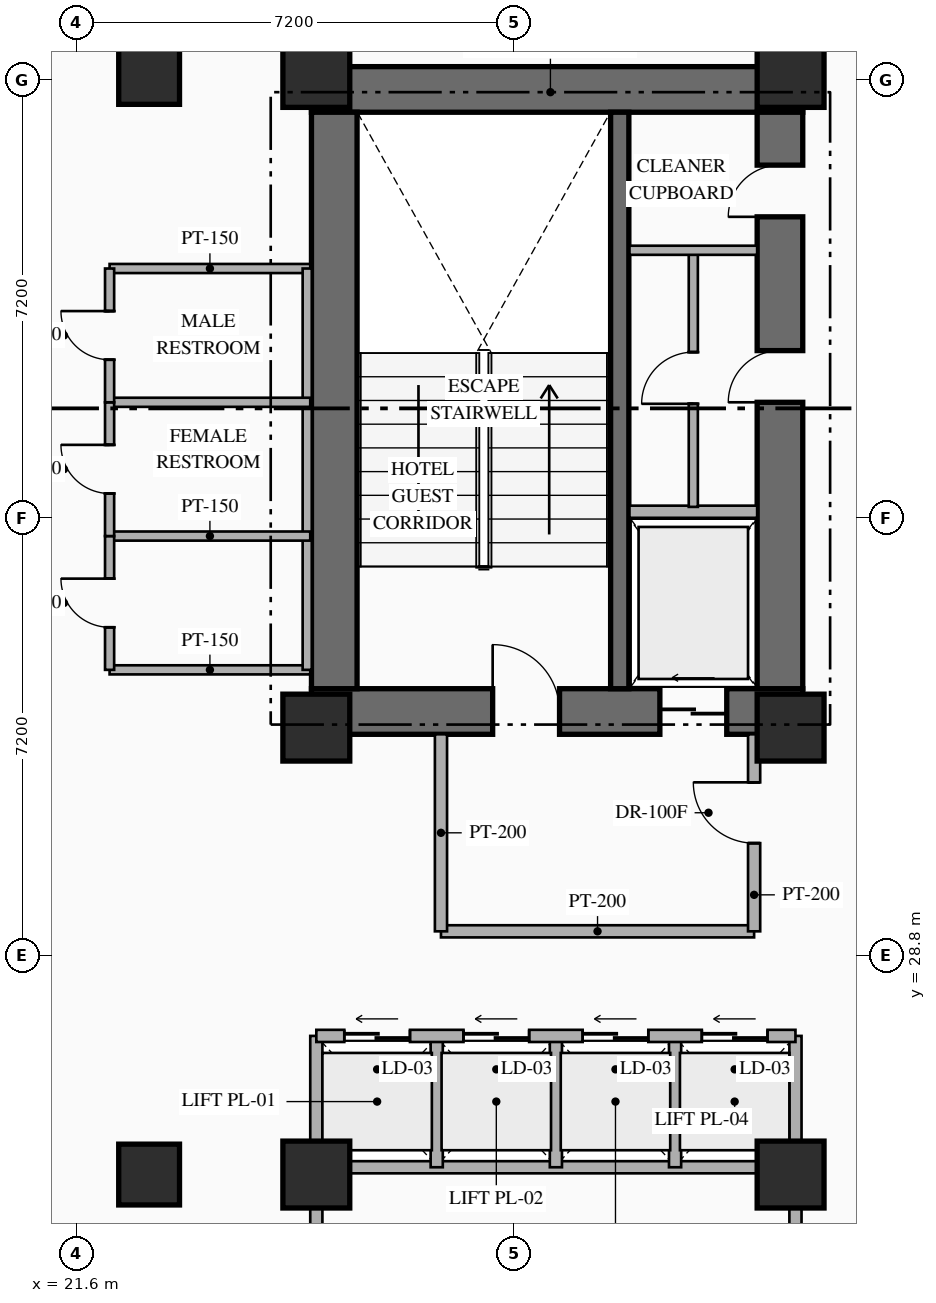
"""IFC4 building model, lengths in metres.
Left out: names, types, materials, properties, quantities, classifications, styles, units other than length and angle.
Written with IfcOpenShell. Run it as: python <this file> out.ifc"""

import sys

from ifc_helpers import new_model, si_unit, direction, frame, frame_2d, origin, origin_2d, place, context, subcontext, project, spatial, rectangle, hollow_rectangle, extrude, element, fill, save


model = new_model("IFC4")
c1 = context("Model", 3, precision=1e-05, world=origin(), true_north=direction((0.0, 1.0)))
c2 = subcontext(c1, "Body", "Model", "MODEL_VIEW")
j1 = project(units=[si_unit("LENGTHUNIT", "METRE"), si_unit("PLANEANGLEUNIT", "RADIAN")], contexts=[c1])
p1 = place(None, origin())
s1 = spatial("IfcSite", under=j1, at=p1, CompositionType="ELEMENT")
p2 = place(p1, origin())
s2 = spatial("IfcBuilding", under=s1, at=p2, CompositionType="ELEMENT")
p3 = place(p2, frame((0.0, 0.0, 63.4)))
s3 = spatial("IfcBuildingStorey", under=s2, at=p3, CompositionType="ELEMENT", Elevation=63.4)
p4 = place(p3, frame((25.47, 32.815, 0.0), z_axis=(0.0, 0.0, 1.0), x_axis=(1.0, 0.0, 0.0)))
e1 = element("IfcWall", 1, at=p4, inside=s3, PredefinedType="SHEAR", context=c2, shape_type="SweptSolid", body=[
    extrude(rectangle(XDim=8.08, YDim=0.75, at=frame_2d((4.04, 0.0))), origin(), (0.0, 0.0, 1.0), 3.35),
])
p5 = place(p4, frame((2.98, 0.0, 0.0)))
e2 = element("IfcOpeningElement", 2, at=p5, cuts=e1, PredefinedType="OPENING", context=c2, shape_type="SweptSolid", body=[
    extrude(rectangle(XDim=1.1, YDim=2.2, at=frame_2d((0.55, 1.1))), frame((0.0, 0.385, 0.0), z_axis=(0.0, -1.0, 0.0), x_axis=(1.0, 0.0, 0.0)), (0.0, 0.0, 1.0), 0.77),
])
p6 = place(p4, frame((5.73, 0.0, 0.0)))
e3 = element("IfcOpeningElement", 3, at=p6, cuts=e1, PredefinedType="OPENING", context=c2, shape_type="SweptSolid", body=[
    extrude(rectangle(XDim=1.1, YDim=2.15, at=frame_2d((0.55, 1.075))), frame((0.0, 0.385, 0.0), z_axis=(0.0, -1.0, 0.0), x_axis=(1.0, 0.0, 0.0)), (0.0, 0.0, 1.0), 0.77),
])
p7 = place(p3, frame((25.47, 43.045, 0.0), z_axis=(0.0, 0.0, 1.0), x_axis=(1.0, 0.0, 0.0)))
e4 = element("IfcWall", 4, at=p7, inside=s3, PredefinedType="SHEAR", context=c2, shape_type="SweptSolid", body=[
    extrude(rectangle(XDim=8.08, YDim=0.75, at=frame_2d((4.04, 0.0))), origin(), (0.0, 0.0, 1.0), 3.35),
])
p8 = place(p3, frame((25.845, 33.19, 0.0), z_axis=(0.0, 0.0, 1.0), x_axis=(0.0, 1.0, 0.0)))
e5 = element("IfcWall", 5, at=p8, inside=s3, PredefinedType="SHEAR", context=c2, shape_type="SweptSolid", body=[
    extrude(rectangle(XDim=9.48, YDim=0.75, at=frame_2d((4.74, 0.0))), origin(), (0.0, 0.0, 1.0), 3.35),
])
p9 = place(p3, frame((33.175, 33.19, 0.0), z_axis=(0.0, 0.0, 1.0), x_axis=(0.0, 1.0, 0.0)))
e6 = element("IfcWall", 6, at=p9, inside=s3, PredefinedType="SHEAR", context=c2, shape_type="SweptSolid", body=[
    extrude(rectangle(XDim=9.48, YDim=0.75, at=frame_2d((4.74, 0.0))), origin(), (0.0, 0.0, 1.0), 3.35),
])
p10 = place(p9, frame((4.71, 0.0, 0.0)))
e7 = element("IfcOpeningElement", 7, at=p10, cuts=e6, PredefinedType="OPENING", context=c2, shape_type="SweptSolid", body=[
    extrude(rectangle(XDim=0.85, YDim=2.08, at=frame_2d((0.425, 1.04))), frame((0.0, 0.385, 0.0), z_axis=(0.0, -1.0, 0.0), x_axis=(1.0, 0.0, 0.0)), (0.0, 0.0, 1.0), 0.77),
])
p11 = place(p9, frame((7.76, 0.0, 0.0)))
e8 = element("IfcOpeningElement", 8, at=p11, cuts=e6, PredefinedType="OPENING", context=c2, shape_type="SweptSolid", body=[
    extrude(rectangle(XDim=0.85, YDim=2.08, at=frame_2d((0.425, 1.04))), frame((0.0, 0.385, 0.0), z_axis=(0.0, -1.0, 0.0), x_axis=(1.0, 0.0, 0.0)), (0.0, 0.0, 1.0), 0.77),
])
p12 = place(p3, frame((30.54, 33.19, 0.0), z_axis=(0.0, 0.0, 1.0), x_axis=(0.0, 1.0, 0.0)))
e9 = element("IfcWall", 9, at=p12, inside=s3, PredefinedType="SHEAR", context=c2, shape_type="SweptSolid", body=[
    extrude(rectangle(XDim=9.48, YDim=0.3, at=frame_2d((4.74, 0.0))), origin(), (0.0, 0.0, 1.0), 3.35),
])
for number, where, z_axis, x_axis in (
    (10, (25.55, 32.55, 0.0), (0.0, 0.0, 1.0), (1.0, 0.0, 0.0)),
    (11, (33.35, 32.55, 0.0), (0.0, 0.0, 1.0), (1.0, 0.0, 0.0)),
    (12, (25.55, 43.3, 0.0), (0.0, 0.0, 1.0), (1.0, 0.0, 0.0)),
    (13, (33.35, 43.3, 0.0), (0.0, 0.0, 1.0), (1.0, 0.0, 0.0)),
):
    element("IfcColumn", number, at=place(p3, frame(where, z_axis=z_axis, x_axis=x_axis)), inside=s3, PredefinedType="COLUMN", context=c2, shape_type="SweptSolid", body=[
        extrude(rectangle(XDim=1.1, YDim=1.1, at=origin_2d()), origin(), (0.0, 0.0, 1.0), 3.35),
    ])
for number, where, z_axis, x_axis in (
    (14, (25.55, 25.2, 0.0), (0.0, 0.0, 1.0), (1.0, 0.0, 0.0)),
    (15, (33.35, 25.2, 0.0), (0.0, 0.0, 1.0), (1.0, 0.0, 0.0)),
):
    element("IfcColumn", number, at=place(p3, frame(where, z_axis=z_axis, x_axis=x_axis)), inside=s3, PredefinedType="COLUMN", context=c2, shape_type="SweptSolid", body=[
        extrude(hollow_rectangle(XDim=1.1, YDim=1.1, WallThickness=0.04, at=origin_2d()), origin(), (0.0, 0.0, 1.0), 3.35),
    ])
for number, where, z_axis, x_axis in (
    (16, (22.8, 25.2, 0.0), (0.0, 0.0, 1.0), (1.0, 0.0, 0.0)),
    (17, (22.8, 43.3, 0.0), (0.0, 0.0, 1.0), (1.0, 0.0, 0.0)),
):
    element("IfcColumn", number, at=place(p3, frame(where, z_axis=z_axis, x_axis=x_axis)), inside=s3, PredefinedType="COLUMN", context=c2, shape_type="SweptSolid", body=[
        extrude(hollow_rectangle(XDim=1.0, YDim=1.0, WallThickness=0.038, at=origin_2d()), origin(), (0.0, 0.0, 1.0), 3.35),
    ])
p13 = place(p3, frame((30.7, 36.1, 0.0), z_axis=(0.0, 0.0, 1.0), x_axis=(1.0, 0.0, 0.0)))
e18 = element("IfcWall", 18, at=p13, inside=s3, PredefinedType="STANDARD", context=c2, shape_type="SweptSolid", body=[
    extrude(rectangle(XDim=2.1, YDim=0.2, at=frame_2d((1.05, 0.0))), origin(), (0.0, 0.0, 1.0), 3.13),
])
p14 = place(p3, frame((31.75, 36.18, 0.0), z_axis=(0.0, 0.0, 1.0), x_axis=(0.0, 1.0, 0.0)))
e19 = element("IfcWall", 19, at=p14, inside=s3, PredefinedType="PARTITIONING", context=c2, shape_type="SweptSolid", body=[
    extrude(rectangle(XDim=4.24, YDim=0.15, at=frame_2d((2.12, 0.0))), origin(), (0.0, 0.0, 1.0), 3.13),
])
p15 = place(p14, frame((1.695, 0.0, 0.0)))
e20 = element("IfcOpeningElement", 20, at=p15, cuts=e19, PredefinedType="OPENING", context=c2, shape_type="SweptSolid", body=[
    extrude(rectangle(XDim=0.85, YDim=2.08, at=frame_2d((0.425, 1.04))), frame((0.0, 0.085, 0.0), z_axis=(0.0, -1.0, 0.0), x_axis=(1.0, 0.0, 0.0)), (0.0, 0.0, 1.0), 0.17),
])
p16 = place(p3, frame((30.7, 40.4, 0.0), z_axis=(0.0, 0.0, 1.0), x_axis=(1.0, 0.0, 0.0)))
e21 = element("IfcWall", 21, at=p16, inside=s3, PredefinedType="PARTITIONING", context=c2, shape_type="SweptSolid", body=[
    extrude(rectangle(XDim=2.1, YDim=0.15, at=frame_2d((1.05, 0.0))), origin(), (0.0, 0.0, 1.0), 3.13),
])
p17 = place(p3, frame((27.6, 29.2, 0.0), z_axis=(0.0, 0.0, 1.0), x_axis=(1.0, 0.0, 0.0)))
e22 = element("IfcWall", 22, at=p17, inside=s3, PredefinedType="STANDARD", context=c2, shape_type="SweptSolid", body=[
    extrude(rectangle(XDim=5.15, YDim=0.2, at=frame_2d((2.575, 0.0))), origin(), (0.0, 0.0, 1.0), 3.13),
])
p18 = place(p3, frame((27.6, 29.2, 0.0), z_axis=(0.0, 0.0, 1.0), x_axis=(0.0, 1.0, 0.0)))
e23 = element("IfcWall", 23, at=p18, inside=s3, PredefinedType="STANDARD", context=c2, shape_type="SweptSolid", body=[
    extrude(rectangle(XDim=3.24, YDim=0.2, at=frame_2d((1.62, 0.0))), origin(), (0.0, 0.0, 1.0), 3.13),
])
p19 = place(p3, frame((32.75, 29.2, 0.0), z_axis=(0.0, 0.0, 1.0), x_axis=(0.0, 1.0, 0.0)))
e24 = element("IfcWall", 24, at=p19, inside=s3, PredefinedType="STANDARD", context=c2, shape_type="SweptSolid", body=[
    extrude(rectangle(XDim=3.24, YDim=0.2, at=frame_2d((1.62, 0.0))), origin(), (0.0, 0.0, 1.0), 3.13),
])
p20 = place(p19, frame((1.45, 0.0, 0.0)))
e25 = element("IfcOpeningElement", 25, at=p20, cuts=e24, PredefinedType="OPENING", context=c2, shape_type="SweptSolid", body=[
    extrude(rectangle(XDim=1.0, YDim=2.2, at=frame_2d((0.5, 1.1))), frame((0.0, 0.11, 0.0), z_axis=(0.0, -1.0, 0.0), x_axis=(1.0, 0.0, 0.0)), (0.0, 0.0, 1.0), 0.22),
])
for number, where, z_axis, x_axis in (
    (26, (25.55, 23.4, 0.0), (0.0, 0.0, 1.0), (0.0, 1.0, 0.0)),
    (27, (33.43, 23.4, 0.0), (0.0, 0.0, 1.0), (0.0, 1.0, 0.0)),
):
    element("IfcWall", number, at=place(p3, frame(where, z_axis=z_axis, x_axis=x_axis)), inside=s3, PredefinedType="STANDARD", context=c2, shape_type="SweptSolid", body=[
        extrude(rectangle(XDim=4.08, YDim=0.2, at=frame_2d((2.04, 0.0))), origin(), (0.0, 0.0, 1.0), 2.425),
    ])
p21 = place(p3, frame((25.55, 25.32, 0.0), z_axis=(0.0, 0.0, 1.0), x_axis=(1.0, 0.0, 0.0)))
e28 = element("IfcWall", 28, at=p21, inside=s3, PredefinedType="STANDARD", context=c2, shape_type="SweptSolid", body=[
    extrude(rectangle(XDim=7.88, YDim=0.2, at=frame_2d((3.94, 0.0))), origin(), (0.0, 0.0, 1.0), 2.525),
])
for number, where, z_axis, x_axis in (
    (29, (27.53, 25.32, 0.0), (0.0, 0.0, 1.0), (0.0, 1.0, 0.0)),
    (30, (29.49, 25.32, 0.0), (0.0, 0.0, 1.0), (0.0, 1.0, 0.0)),
    (31, (31.45, 25.32, 0.0), (0.0, 0.0, 1.0), (0.0, 1.0, 0.0)),
):
    element("IfcWall", number, at=place(p3, frame(where, z_axis=z_axis, x_axis=x_axis)), inside=s3, PredefinedType="STANDARD", context=c2, shape_type="SweptSolid", body=[
        extrude(rectangle(XDim=2.16, YDim=0.2, at=frame_2d((1.08, 0.0))), origin(), (0.0, 0.0, 1.0), 3.13),
    ])
p22 = place(p3, frame((25.55, 27.48, 0.0), z_axis=(0.0, 0.0, 1.0), x_axis=(1.0, 0.0, 0.0)))
e32 = element("IfcWall", 32, at=p22, inside=s3, PredefinedType="STANDARD", context=c2, shape_type="SweptSolid", body=[
    extrude(rectangle(XDim=7.88, YDim=0.2, at=frame_2d((3.94, 0.0))), origin(), (0.0, 0.0, 1.0), 3.13),
])
p23 = place(p22, frame((0.46, 0.0, 0.0)))
e33 = element("IfcOpeningElement", 33, at=p23, cuts=e32, PredefinedType="OPENING", context=c2, shape_type="SweptSolid", body=[
    extrude(rectangle(XDim=1.08, YDim=2.15, at=frame_2d((0.54, 1.075))), frame((0.0, 0.11, 0.0), z_axis=(0.0, -1.0, 0.0), x_axis=(1.0, 0.0, 0.0)), (0.0, 0.0, 1.0), 0.22),
])
p24 = place(p22, frame((2.42, 0.0, 0.0)))
e34 = element("IfcOpeningElement", 34, at=p24, cuts=e32, PredefinedType="OPENING", context=c2, shape_type="SweptSolid", body=[
    extrude(rectangle(XDim=1.08, YDim=2.15, at=frame_2d((0.54, 1.075))), frame((0.0, 0.11, 0.0), z_axis=(0.0, -1.0, 0.0), x_axis=(1.0, 0.0, 0.0)), (0.0, 0.0, 1.0), 0.22),
])
p25 = place(p22, frame((4.38, 0.0, 0.0)))
e35 = element("IfcOpeningElement", 35, at=p25, cuts=e32, PredefinedType="OPENING", context=c2, shape_type="SweptSolid", body=[
    extrude(rectangle(XDim=1.08, YDim=2.15, at=frame_2d((0.54, 1.075))), frame((0.0, 0.11, 0.0), z_axis=(0.0, -1.0, 0.0), x_axis=(1.0, 0.0, 0.0)), (0.0, 0.0, 1.0), 0.22),
])
p26 = place(p22, frame((6.34, 0.0, 0.0)))
e36 = element("IfcOpeningElement", 36, at=p26, cuts=e32, PredefinedType="OPENING", context=c2, shape_type="SweptSolid", body=[
    extrude(rectangle(XDim=1.08, YDim=2.15, at=frame_2d((0.54, 1.075))), frame((0.0, 0.11, 0.0), z_axis=(0.0, -1.0, 0.0), x_axis=(1.0, 0.0, 0.0)), (0.0, 0.0, 1.0), 0.22),
])
for number, where, z_axis, x_axis in (
    (37, (22.15, 33.5, 0.0), (0.0, 0.0, 1.0), (1.0, 0.0, 0.0)),
    (38, (22.15, 40.1, 0.0), (0.0, 0.0, 1.0), (1.0, 0.0, 0.0)),
):
    element("IfcWall", number, at=place(p3, frame(where, z_axis=z_axis, x_axis=x_axis)), inside=s3, PredefinedType="PARTITIONING", context=c2, shape_type="SweptSolid", body=[
        extrude(rectangle(XDim=3.3, YDim=0.15, at=frame_2d((1.65, 0.0))), origin(), (0.0, 0.0, 1.0), 3.13),
    ])
p27 = place(p3, frame((25.4, 33.5, 0.0), z_axis=(0.0, 0.0, 1.0), x_axis=(0.0, 1.0, 0.0)))
e39 = element("IfcWall", 39, at=p27, inside=s3, PredefinedType="PARTITIONING", context=c2, shape_type="SweptSolid", body=[
    extrude(rectangle(XDim=6.6, YDim=0.15, at=frame_2d((3.3, 0.0))), origin(), (0.0, 0.0, 1.0), 3.13),
])
for number, where, z_axis, x_axis in (
    (40, (22.15, 35.7, 0.0), (0.0, 0.0, 1.0), (1.0, 0.0, 0.0)),
    (41, (22.15, 37.9, 0.0), (0.0, 0.0, 1.0), (1.0, 0.0, 0.0)),
):
    element("IfcWall", number, at=place(p3, frame(where, z_axis=z_axis, x_axis=x_axis)), inside=s3, PredefinedType="PARTITIONING", context=c2, shape_type="SweptSolid", body=[
        extrude(rectangle(XDim=3.3, YDim=0.15, at=frame_2d((1.65, 0.0))), origin(), (0.0, 0.0, 1.0), 3.13),
    ])
p28 = place(p3, frame((22.15, 33.5, 0.0), z_axis=(0.0, 0.0, 1.0), x_axis=(0.0, 1.0, 0.0)))
e42 = element("IfcWall", 42, at=p28, inside=s3, PredefinedType="PARTITIONING", context=c2, shape_type="SweptSolid", body=[
    extrude(rectangle(XDim=2.2, YDim=0.15, at=frame_2d((1.1, 0.0))), origin(), (0.0, 0.0, 1.0), 3.13),
])
p29 = place(p28, frame((0.7, 0.0, 0.0)))
e43 = element("IfcOpeningElement", 43, at=p29, cuts=e42, PredefinedType="OPENING", context=c2, shape_type="SweptSolid", body=[
    extrude(rectangle(XDim=0.8, YDim=2.06, at=frame_2d((0.4, 1.03))), frame((0.0, 0.085, 0.0), z_axis=(0.0, -1.0, 0.0), x_axis=(1.0, 0.0, 0.0)), (0.0, 0.0, 1.0), 0.17),
])
p30 = place(p3, frame((22.15, 35.7, 0.0), z_axis=(0.0, 0.0, 1.0), x_axis=(0.0, 1.0, 0.0)))
e44 = element("IfcWall", 44, at=p30, inside=s3, PredefinedType="PARTITIONING", context=c2, shape_type="SweptSolid", body=[
    extrude(rectangle(XDim=2.2, YDim=0.15, at=frame_2d((1.1, 0.0))), origin(), (0.0, 0.0, 1.0), 3.13),
])
p31 = place(p30, frame((0.7, 0.0, 0.0)))
e45 = element("IfcOpeningElement", 45, at=p31, cuts=e44, PredefinedType="OPENING", context=c2, shape_type="SweptSolid", body=[
    extrude(rectangle(XDim=0.8, YDim=2.06, at=frame_2d((0.4, 1.03))), frame((0.0, 0.085, 0.0), z_axis=(0.0, -1.0, 0.0), x_axis=(1.0, 0.0, 0.0)), (0.0, 0.0, 1.0), 0.17),
])
p32 = place(p3, frame((22.15, 37.9, 0.0), z_axis=(0.0, 0.0, 1.0), x_axis=(0.0, 1.0, 0.0)))
e46 = element("IfcWall", 46, at=p32, inside=s3, PredefinedType="PARTITIONING", context=c2, shape_type="SweptSolid", body=[
    extrude(rectangle(XDim=2.2, YDim=0.15, at=frame_2d((1.1, 0.0))), origin(), (0.0, 0.0, 1.0), 3.13),
])
p33 = place(p32, frame((0.7, 0.0, 0.0)))
e47 = element("IfcOpeningElement", 47, at=p33, cuts=e46, PredefinedType="OPENING", context=c2, shape_type="SweptSolid", body=[
    extrude(rectangle(XDim=0.8, YDim=2.06, at=frame_2d((0.4, 1.03))), frame((0.0, 0.085, 0.0), z_axis=(0.0, -1.0, 0.0), x_axis=(1.0, 0.0, 0.0)), (0.0, 0.0, 1.0), 0.17),
])
p34 = place(p3, frame((33.384, 17.312, 0.0), z_axis=(0.0, 0.0, 1.0), x_axis=(0.600008743659, 0.799993442181, 0.0)))
e48 = element("IfcWall", 48, at=p34, inside=s3, PredefinedType="PARTITIONING", context=c2, shape_type="SweptSolid", body=[
    extrude(rectangle(XDim=8.935, YDim=0.15, at=frame_2d((4.468, 0.0))), origin(), (0.0, 0.0, 1.0), 3.13),
])
p35 = place(p5, origin())
e49 = element("IfcDoor", 49, at=p35, inside=s3, OperationType="SINGLE_SWING_LEFT", PredefinedType="DOOR", context=c2, shape_type="SweptSolid", body=[
    extrude(rectangle(XDim=1.1, YDim=2.2, at=frame_2d((0.55, 1.1))), frame((0.0, 0.025, 0.0), z_axis=(0.0, -1.0, 0.0), x_axis=(1.0, 0.0, 0.0)), (0.0, 0.0, 1.0), 0.05),
])
fill(e2, e49)
p36 = place(p6, origin())
e50 = element("IfcDoor", 50, at=p36, inside=s3, OperationType="SLIDING_TO_LEFT", PredefinedType="USERDEFINED", context=c2, shape_type="SweptSolid", body=[
    extrude(rectangle(XDim=1.1, YDim=2.15, at=frame_2d((0.55, 1.075))), frame((0.0, 0.025, 0.0), z_axis=(0.0, -1.0, 0.0), x_axis=(1.0, 0.0, 0.0)), (0.0, 0.0, 1.0), 0.05),
])
fill(e3, e50)
p37 = place(p10, origin())
e51 = element("IfcDoor", 51, at=p37, inside=s3, OperationType="SINGLE_SWING_LEFT", PredefinedType="DOOR", context=c2, shape_type="SweptSolid", body=[
    extrude(rectangle(XDim=0.85, YDim=2.08, at=frame_2d((0.425, 1.04))), frame((0.0, 0.025, 0.0), z_axis=(0.0, -1.0, 0.0), x_axis=(1.0, 0.0, 0.0)), (0.0, 0.0, 1.0), 0.05),
])
fill(e7, e51)
p38 = place(p11, origin())
e52 = element("IfcDoor", 52, at=p38, inside=s3, OperationType="SINGLE_SWING_LEFT", PredefinedType="DOOR", context=c2, shape_type="SweptSolid", body=[
    extrude(rectangle(XDim=0.85, YDim=2.08, at=frame_2d((0.425, 1.04))), frame((0.0, 0.025, 0.0), z_axis=(0.0, -1.0, 0.0), x_axis=(1.0, 0.0, 0.0)), (0.0, 0.0, 1.0), 0.05),
])
fill(e8, e52)
p39 = place(p15, origin())
e53 = element("IfcDoor", 53, at=p39, inside=s3, OperationType="SINGLE_SWING_LEFT", PredefinedType="DOOR", context=c2, shape_type="SweptSolid", body=[
    extrude(rectangle(XDim=0.85, YDim=2.08, at=frame_2d((0.425, 1.04))), frame((0.0, 0.025, 0.0), z_axis=(0.0, -1.0, 0.0), x_axis=(1.0, 0.0, 0.0)), (0.0, 0.0, 1.0), 0.05),
])
fill(e20, e53)
p40 = place(p20, origin())
e54 = element("IfcDoor", 54, at=p40, inside=s3, OperationType="SINGLE_SWING_RIGHT", PredefinedType="DOOR", context=c2, shape_type="SweptSolid", body=[
    extrude(rectangle(XDim=1.0, YDim=2.2, at=frame_2d((0.5, 1.1))), frame((0.0, 0.025, 0.0), z_axis=(0.0, -1.0, 0.0), x_axis=(1.0, 0.0, 0.0)), (0.0, 0.0, 1.0), 0.05),
])
fill(e25, e54)
p41 = place(p23, origin())
e55 = element("IfcDoor", 55, at=p41, inside=s3, OperationType="SLIDING_TO_LEFT", PredefinedType="USERDEFINED", context=c2, shape_type="SweptSolid", body=[
    extrude(rectangle(XDim=1.08, YDim=2.15, at=frame_2d((0.54, 1.075))), frame((0.0, 0.025, 0.0), z_axis=(0.0, -1.0, 0.0), x_axis=(1.0, 0.0, 0.0)), (0.0, 0.0, 1.0), 0.05),
])
fill(e33, e55)
p42 = place(p24, origin())
e56 = element("IfcDoor", 56, at=p42, inside=s3, OperationType="SLIDING_TO_LEFT", PredefinedType="USERDEFINED", context=c2, shape_type="SweptSolid", body=[
    extrude(rectangle(XDim=1.08, YDim=2.15, at=frame_2d((0.54, 1.075))), frame((0.0, 0.025, 0.0), z_axis=(0.0, -1.0, 0.0), x_axis=(1.0, 0.0, 0.0)), (0.0, 0.0, 1.0), 0.05),
])
fill(e34, e56)
p43 = place(p25, origin())
e57 = element("IfcDoor", 57, at=p43, inside=s3, OperationType="SLIDING_TO_LEFT", PredefinedType="USERDEFINED", context=c2, shape_type="SweptSolid", body=[
    extrude(rectangle(XDim=1.08, YDim=2.15, at=frame_2d((0.54, 1.075))), frame((0.0, 0.025, 0.0), z_axis=(0.0, -1.0, 0.0), x_axis=(1.0, 0.0, 0.0)), (0.0, 0.0, 1.0), 0.05),
])
fill(e35, e57)
p44 = place(p26, origin())
e58 = element("IfcDoor", 58, at=p44, inside=s3, OperationType="SLIDING_TO_LEFT", PredefinedType="USERDEFINED", context=c2, shape_type="SweptSolid", body=[
    extrude(rectangle(XDim=1.08, YDim=2.15, at=frame_2d((0.54, 1.075))), frame((0.0, 0.025, 0.0), z_axis=(0.0, -1.0, 0.0), x_axis=(1.0, 0.0, 0.0)), (0.0, 0.0, 1.0), 0.05),
])
fill(e36, e58)
p45 = place(p29, origin())
e59 = element("IfcDoor", 59, at=p45, inside=s3, OperationType="SINGLE_SWING_RIGHT", PredefinedType="DOOR", context=c2, shape_type="SweptSolid", body=[
    extrude(rectangle(XDim=0.8, YDim=2.06, at=frame_2d((0.4, 1.03))), frame((0.0, 0.025, 0.0), z_axis=(0.0, -1.0, 0.0), x_axis=(1.0, 0.0, 0.0)), (0.0, 0.0, 1.0), 0.05),
])
fill(e43, e59)
p46 = place(p31, origin())
e60 = element("IfcDoor", 60, at=p46, inside=s3, OperationType="SINGLE_SWING_RIGHT", PredefinedType="DOOR", context=c2, shape_type="SweptSolid", body=[
    extrude(rectangle(XDim=0.8, YDim=2.06, at=frame_2d((0.4, 1.03))), frame((0.0, 0.025, 0.0), z_axis=(0.0, -1.0, 0.0), x_axis=(1.0, 0.0, 0.0)), (0.0, 0.0, 1.0), 0.05),
])
fill(e45, e60)
p47 = place(p33, origin())
e61 = element("IfcDoor", 61, at=p47, inside=s3, OperationType="SINGLE_SWING_RIGHT", PredefinedType="DOOR", context=c2, shape_type="SweptSolid", body=[
    extrude(rectangle(XDim=0.8, YDim=2.06, at=frame_2d((0.4, 1.03))), frame((0.0, 0.025, 0.0), z_axis=(0.0, -1.0, 0.0), x_axis=(1.0, 0.0, 0.0)), (0.0, 0.0, 1.0), 0.05),
])
fill(e47, e61)
save(model, sys.argv[1])
